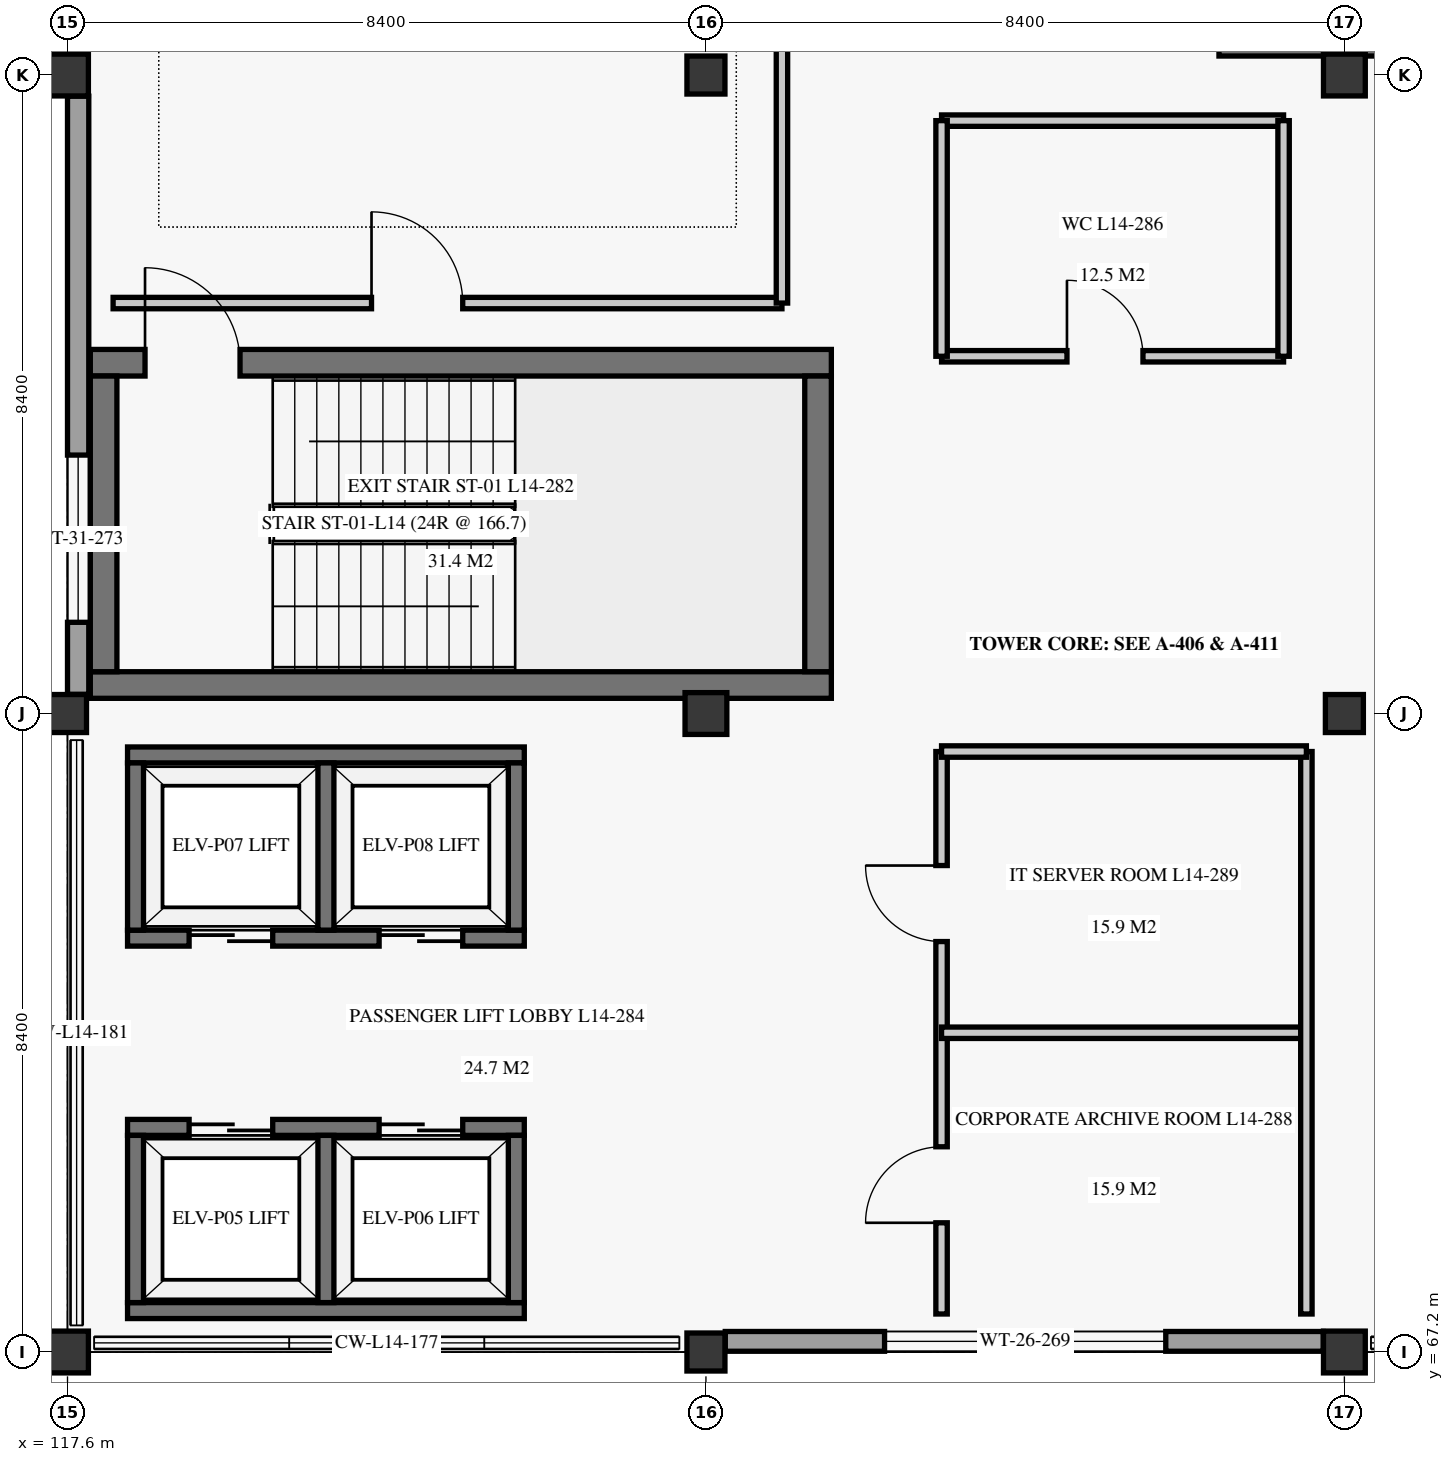
"""IFC4 building model, lengths in metres.
Left out: names, types, materials, properties, quantities, classifications, styles, units other than length and angle.
Written with IfcOpenShell. Run it as: python <this file> out.ifc"""

import sys

from ifc_helpers import new_model, si_unit, direction, frame, frame_2d, origin, origin_2d, place, context, subcontext, project, spatial, rectangle, extrude, element, fill, save


model = new_model("IFC4")
c1 = context("Model", 3, precision=1e-05, world=origin(), true_north=direction((0.0, 1.0)))
c2 = subcontext(c1, "Body", "Model", "MODEL_VIEW")
j1 = project(units=[si_unit("LENGTHUNIT", "METRE"), si_unit("PLANEANGLEUNIT", "RADIAN")], contexts=[c1])
p1 = place(None, origin())
s1 = spatial("IfcSite", under=j1, at=p1, CompositionType="ELEMENT")
p2 = place(p1, origin())
s2 = spatial("IfcBuilding", under=s1, at=p2, CompositionType="ELEMENT")
p3 = place(p2, frame((0.0, 0.0, 58.7)))
s3 = spatial("IfcBuildingStorey", under=s2, at=p3, CompositionType="ELEMENT", Elevation=58.7)
p4 = place(p3, frame((117.6, 67.2, 0.0), z_axis=(0.0, 0.0, 1.0), x_axis=(1.0, 0.0, 0.0)))
e1 = element("IfcColumn", 1, at=p4, inside=s3, PredefinedType="COLUMN", context=c2, shape_type="SweptSolid", body=[
    extrude(rectangle(XDim=0.55, YDim=0.55, at=origin_2d()), origin(), (0.0, 0.0, 1.0), 3.72),
])
p5 = place(p3, frame((117.6, 75.6, 0.0), z_axis=(0.0, 0.0, 1.0), x_axis=(1.0, 0.0, 0.0)))
e2 = element("IfcColumn", 2, at=p5, inside=s3, PredefinedType="COLUMN", context=c2, shape_type="SweptSolid", body=[
    extrude(rectangle(XDim=0.5, YDim=0.5, at=origin_2d()), origin(), (0.0, 0.0, 1.0), 3.72),
])
p6 = place(p3, frame((117.6, 84.0, 0.0), z_axis=(0.0, 0.0, 1.0), x_axis=(1.0, 0.0, 0.0)))
e3 = element("IfcColumn", 3, at=p6, inside=s3, PredefinedType="COLUMN", context=c2, shape_type="SweptSolid", body=[
    extrude(rectangle(XDim=0.55, YDim=0.55, at=origin_2d()), origin(), (0.0, 0.0, 1.0), 3.72),
])
p7 = place(p3, frame((126.0, 67.2, 0.0), z_axis=(0.0, 0.0, 1.0), x_axis=(1.0, 0.0, 0.0)))
e4 = element("IfcColumn", 4, at=p7, inside=s3, PredefinedType="COLUMN", context=c2, shape_type="SweptSolid", body=[
    extrude(rectangle(XDim=0.5, YDim=0.5, at=origin_2d()), origin(), (0.0, 0.0, 1.0), 3.72),
])
p8 = place(p3, frame((126.0, 75.6, 0.0), z_axis=(0.0, 0.0, 1.0), x_axis=(1.0, 0.0, 0.0)))
e5 = element("IfcColumn", 5, at=p8, inside=s3, PredefinedType="COLUMN", context=c2, shape_type="SweptSolid", body=[
    extrude(rectangle(XDim=0.55, YDim=0.55, at=origin_2d()), origin(), (0.0, 0.0, 1.0), 3.72),
])
p9 = place(p3, frame((126.0, 84.0, 0.0), z_axis=(0.0, 0.0, 1.0), x_axis=(1.0, 0.0, 0.0)))
e6 = element("IfcColumn", 6, at=p9, inside=s3, PredefinedType="COLUMN", context=c2, shape_type="SweptSolid", body=[
    extrude(rectangle(XDim=0.5, YDim=0.5, at=origin_2d()), origin(), (0.0, 0.0, 1.0), 3.72),
])
p10 = place(p3, frame((134.4, 67.2, 0.0), z_axis=(0.0, 0.0, 1.0), x_axis=(1.0, 0.0, 0.0)))
e7 = element("IfcColumn", 7, at=p10, inside=s3, PredefinedType="COLUMN", context=c2, shape_type="SweptSolid", body=[
    extrude(rectangle(XDim=0.55, YDim=0.55, at=origin_2d()), origin(), (0.0, 0.0, 1.0), 3.72),
])
p11 = place(p3, frame((134.4, 75.6, 0.0), z_axis=(0.0, 0.0, 1.0), x_axis=(1.0, 0.0, 0.0)))
e8 = element("IfcColumn", 8, at=p11, inside=s3, PredefinedType="COLUMN", context=c2, shape_type="SweptSolid", body=[
    extrude(rectangle(XDim=0.5, YDim=0.5, at=origin_2d()), origin(), (0.0, 0.0, 1.0), 3.72),
])
p12 = place(p3, frame((134.4, 84.0, 0.0), z_axis=(0.0, 0.0, 1.0), x_axis=(1.0, 0.0, 0.0)))
e9 = element("IfcColumn", 9, at=p12, inside=s3, PredefinedType="COLUMN", context=c2, shape_type="SweptSolid", body=[
    extrude(rectangle(XDim=0.55, YDim=0.55, at=origin_2d()), origin(), (0.0, 0.0, 1.0), 3.72),
])
p13 = place(p3, frame((126.254, 67.34, 0.0), z_axis=(0.0, 0.0, 1.0), x_axis=(1.0, 0.0, 0.0)))
e10 = element("IfcWall", 10, at=p13, inside=s3, PredefinedType="SOLIDWALL", context=c2, shape_type="SweptSolid", body=[
    extrude(rectangle(XDim=7.868, YDim=0.26, at=frame_2d((3.934, 0.0))), origin(), (0.0, 0.0, 1.0), 3.04),
])
p14 = place(p13, frame((2.096, 0.0, 0.85)))
e11 = element("IfcOpeningElement", 11, at=p14, cuts=e10, PredefinedType="OPENING", context=c2, shape_type="SweptSolid", body=[
    extrude(rectangle(XDim=3.7, YDim=1.9, at=frame_2d((1.85, 0.95))), frame((0.0, 0.14, 0.0), z_axis=(0.0, -1.0, 0.0), x_axis=(1.0, 0.0, 0.0)), (0.0, 0.0, 1.0), 0.28),
])
p15 = place(p3, frame((117.74, 75.852, 0.0), z_axis=(0.0, 0.0, 1.0), x_axis=(0.0, 1.0, 0.0)))
e12 = element("IfcWall", 12, at=p15, inside=s3, PredefinedType="SOLIDWALL", context=c2, shape_type="SweptSolid", body=[
    extrude(rectangle(XDim=7.87, YDim=0.28, at=frame_2d((3.935, 0.0))), origin(), (0.0, 0.0, 1.0), 3.04),
])
p16 = place(p15, frame((0.948, 0.0, 0.85)))
e13 = element("IfcOpeningElement", 13, at=p16, cuts=e12, PredefinedType="OPENING", context=c2, shape_type="SweptSolid", body=[
    extrude(rectangle(XDim=2.2, YDim=1.8, at=frame_2d((1.1, 0.9))), frame((0.0, 0.15, 0.0), z_axis=(0.0, -1.0, 0.0), x_axis=(1.0, 0.0, 0.0)), (0.0, 0.0, 1.0), 0.3),
])
p17 = place(p3, frame((117.9, 75.975, 0.0), z_axis=(0.0, 0.0, 1.0), x_axis=(1.0, 0.0, 0.0)))
e14 = element("IfcWall", 14, at=p17, inside=s3, PredefinedType="SHEAR", context=c2, shape_type="SweptSolid", body=[
    extrude(rectangle(XDim=9.75, YDim=0.35, at=frame_2d((4.875, 0.0))), origin(), (0.0, 0.0, 1.0), 3.72),
])
p18 = place(p3, frame((117.9, 80.215, 0.0), z_axis=(0.0, 0.0, 1.0), x_axis=(1.0, 0.0, 0.0)))
e15 = element("IfcWall", 15, at=p18, inside=s3, PredefinedType="SHEAR", context=c2, shape_type="SweptSolid", body=[
    extrude(rectangle(XDim=9.75, YDim=0.35, at=frame_2d((4.875, 0.0))), origin(), (0.0, 0.0, 1.0), 3.72),
])
p19 = place(p18, frame((0.72, 0.0, 0.0)))
e16 = element("IfcOpeningElement", 16, at=p19, cuts=e15, PredefinedType="OPENING", context=c2, shape_type="SweptSolid", body=[
    extrude(rectangle(XDim=1.25, YDim=2.2, at=frame_2d((0.625, 1.1))), frame((0.0, 0.185, 0.0), z_axis=(0.0, -1.0, 0.0), x_axis=(1.0, 0.0, 0.0)), (0.0, 0.0, 1.0), 0.37),
])
for number, where, z_axis, x_axis in (
    (17, (118.075, 76.15, 0.0), (0.0, 0.0, 1.0), (0.0, 1.0, 0.0)),
    (18, (127.475, 76.15, 0.0), (0.0, 0.0, 1.0), (0.0, 1.0, 0.0)),
):
    element("IfcWall", number, at=place(p3, frame(where, z_axis=z_axis, x_axis=x_axis)), inside=s3, PredefinedType="SHEAR", context=c2, shape_type="SweptSolid", body=[
        extrude(rectangle(XDim=3.89, YDim=0.35, at=frame_2d((1.945, 0.0))), origin(), (0.0, 0.0, 1.0), 3.72),
    ])
p20 = place(p3, frame((132.75, 84.425, 0.0), z_axis=(0.0, 0.0, 1.0), x_axis=(1.0, 0.0, 0.0)))
e19 = element("IfcWall", 19, at=p20, inside=s3, PredefinedType="SHEAR", context=c2, shape_type="SweptSolid", body=[
    extrude(rectangle(XDim=9.75, YDim=0.35, at=frame_2d((4.875, 0.0))), origin(), (0.0, 0.0, 1.0), 3.72),
])
p21 = place(p3, frame((118.39, 67.745, 0.0), z_axis=(0.0, 0.0, 1.0), x_axis=(1.0, 0.0, 0.0)))
e20 = element("IfcWall", 20, at=p21, inside=s3, PredefinedType="SHEAR", context=c2, shape_type="SweptSolid", body=[
    extrude(rectangle(XDim=5.22, YDim=0.21, at=frame_2d((2.61, 0.0))), origin(), (0.0, 0.0, 1.0), 3.72),
])
p22 = place(p3, frame((118.39, 70.155, 0.0), z_axis=(0.0, 0.0, 1.0), x_axis=(1.0, 0.0, 0.0)))
e21 = element("IfcWall", 21, at=p22, inside=s3, PredefinedType="SHEAR", context=c2, shape_type="SweptSolid", body=[
    extrude(rectangle(XDim=5.22, YDim=0.21, at=frame_2d((2.61, 0.0))), origin(), (0.0, 0.0, 1.0), 3.72),
])
p23 = place(p22, frame((0.81, 0.0, 0.0)))
e22 = element("IfcOpeningElement", 22, at=p23, cuts=e21, PredefinedType="OPENING", context=c2, shape_type="SweptSolid", body=[
    extrude(rectangle(XDim=1.1, YDim=2.15, at=frame_2d((0.55, 1.075))), frame((0.0, 0.115, 0.0), z_axis=(0.0, -1.0, 0.0), x_axis=(1.0, 0.0, 0.0)), (0.0, 0.0, 1.0), 0.23),
])
p24 = place(p22, frame((3.31, 0.0, 0.0)))
e23 = element("IfcOpeningElement", 23, at=p24, cuts=e21, PredefinedType="OPENING", context=c2, shape_type="SweptSolid", body=[
    extrude(rectangle(XDim=1.1, YDim=2.15, at=frame_2d((0.55, 1.075))), frame((0.0, 0.115, 0.0), z_axis=(0.0, -1.0, 0.0), x_axis=(1.0, 0.0, 0.0)), (0.0, 0.0, 1.0), 0.23),
])
for number, where, z_axis, x_axis in (
    (24, (118.495, 67.85, 0.0), (0.0, 0.0, 1.0), (0.0, 1.0, 0.0)),
    (25, (123.505, 67.85, 0.0), (0.0, 0.0, 1.0), (0.0, 1.0, 0.0)),
    (26, (121.0, 67.85, 0.0), (0.0, 0.0, 1.0), (0.0, 1.0, 0.0)),
):
    element("IfcWall", number, at=place(p3, frame(where, z_axis=z_axis, x_axis=x_axis)), inside=s3, PredefinedType="SHEAR", context=c2, shape_type="SweptSolid", body=[
        extrude(rectangle(XDim=2.2, YDim=0.21, at=frame_2d((1.1, 0.0))), origin(), (0.0, 0.0, 1.0), 3.72),
    ])
p25 = place(p3, frame((118.39, 72.645, 0.0), z_axis=(0.0, 0.0, 1.0), x_axis=(1.0, 0.0, 0.0)))
e27 = element("IfcWall", 27, at=p25, inside=s3, PredefinedType="SHEAR", context=c2, shape_type="SweptSolid", body=[
    extrude(rectangle(XDim=5.22, YDim=0.21, at=frame_2d((2.61, 0.0))), origin(), (0.0, 0.0, 1.0), 3.72),
])
p26 = place(p25, frame((0.81, 0.0, 0.0)))
e28 = element("IfcOpeningElement", 28, at=p26, cuts=e27, PredefinedType="OPENING", context=c2, shape_type="SweptSolid", body=[
    extrude(rectangle(XDim=1.1, YDim=2.15, at=frame_2d((0.55, 1.075))), frame((0.0, 0.115, 0.0), z_axis=(0.0, -1.0, 0.0), x_axis=(1.0, 0.0, 0.0)), (0.0, 0.0, 1.0), 0.23),
])
p27 = place(p25, frame((3.31, 0.0, 0.0)))
e29 = element("IfcOpeningElement", 29, at=p27, cuts=e27, PredefinedType="OPENING", context=c2, shape_type="SweptSolid", body=[
    extrude(rectangle(XDim=1.1, YDim=2.15, at=frame_2d((0.55, 1.075))), frame((0.0, 0.115, 0.0), z_axis=(0.0, -1.0, 0.0), x_axis=(1.0, 0.0, 0.0)), (0.0, 0.0, 1.0), 0.23),
])
p28 = place(p3, frame((118.39, 75.055, 0.0), z_axis=(0.0, 0.0, 1.0), x_axis=(1.0, 0.0, 0.0)))
e30 = element("IfcWall", 30, at=p28, inside=s3, PredefinedType="SHEAR", context=c2, shape_type="SweptSolid", body=[
    extrude(rectangle(XDim=5.22, YDim=0.21, at=frame_2d((2.61, 0.0))), origin(), (0.0, 0.0, 1.0), 3.72),
])
for number, where, z_axis, x_axis in (
    (31, (118.495, 72.75, 0.0), (0.0, 0.0, 1.0), (0.0, 1.0, 0.0)),
    (32, (123.505, 72.75, 0.0), (0.0, 0.0, 1.0), (0.0, 1.0, 0.0)),
    (33, (121.0, 72.75, 0.0), (0.0, 0.0, 1.0), (0.0, 1.0, 0.0)),
):
    element("IfcWall", number, at=place(p3, frame(where, z_axis=z_axis, x_axis=x_axis)), inside=s3, PredefinedType="SHEAR", context=c2, shape_type="SweptSolid", body=[
        extrude(rectangle(XDim=2.2, YDim=0.21, at=frame_2d((1.1, 0.0))), origin(), (0.0, 0.0, 1.0), 3.72),
    ])
p29 = place(p3, frame((129.1, 80.3, 0.0), z_axis=(0.0, 0.0, 1.0), x_axis=(1.0, 0.0, 0.0)))
e34 = element("IfcWall", 34, at=p29, inside=s3, PredefinedType="PARTITIONING", context=c2, shape_type="SweptSolid", body=[
    extrude(rectangle(XDim=4.5, YDim=0.15, at=frame_2d((2.25, 0.0))), origin(), (0.0, 0.0, 1.0), 3.34),
])
p30 = place(p29, frame((1.65, 0.0, 0.0)))
e35 = element("IfcOpeningElement", 35, at=p30, cuts=e34, PredefinedType="OPENING", context=c2, shape_type="SweptSolid", body=[
    extrude(rectangle(XDim=1.0, YDim=2.1, at=frame_2d((0.5, 1.05))), frame((0.0, 0.085, 0.0), z_axis=(0.0, -1.0, 0.0), x_axis=(1.0, 0.0, 0.0)), (0.0, 0.0, 1.0), 0.17),
])
p31 = place(p3, frame((129.1, 83.4, 0.0), z_axis=(0.0, 0.0, 1.0), x_axis=(1.0, 0.0, 0.0)))
e36 = element("IfcWall", 36, at=p31, inside=s3, PredefinedType="PARTITIONING", context=c2, shape_type="SweptSolid", body=[
    extrude(rectangle(XDim=4.5, YDim=0.15, at=frame_2d((2.25, 0.0))), origin(), (0.0, 0.0, 1.0), 3.34),
])
for number, where, z_axis, x_axis in (
    (37, (129.1, 80.3, 0.0), (0.0, 0.0, 1.0), (0.0, 1.0, 0.0)),
    (38, (133.6, 80.3, 0.0), (0.0, 0.0, 1.0), (0.0, 1.0, 0.0)),
):
    element("IfcWall", number, at=place(p3, frame(where, z_axis=z_axis, x_axis=x_axis)), inside=s3, PredefinedType="PARTITIONING", context=c2, shape_type="SweptSolid", body=[
        extrude(rectangle(XDim=3.1, YDim=0.15, at=frame_2d((1.55, 0.0))), origin(), (0.0, 0.0, 1.0), 3.34),
    ])
p32 = place(p3, frame((129.1, 67.7, 0.0), z_axis=(0.0, 0.0, 1.0), x_axis=(0.0, 1.0, 0.0)))
e39 = element("IfcWall", 39, at=p32, inside=s3, PredefinedType="PARTITIONING", context=c2, shape_type="SweptSolid", body=[
    extrude(rectangle(XDim=7.4, YDim=0.15, at=frame_2d((3.7, 0.0))), origin(), (0.0, 0.0, 1.0), 3.34),
])
p33 = place(p32, frame((1.2, 0.0, 0.0)))
e40 = element("IfcOpeningElement", 40, at=p33, cuts=e39, PredefinedType="OPENING", context=c2, shape_type="SweptSolid", body=[
    extrude(rectangle(XDim=1.0, YDim=2.1, at=frame_2d((0.5, 1.05))), frame((0.0, 0.085, 0.0), z_axis=(0.0, -1.0, 0.0), x_axis=(1.0, 0.0, 0.0)), (0.0, 0.0, 1.0), 0.17),
])
p34 = place(p32, frame((4.9, 0.0, 0.0)))
e41 = element("IfcOpeningElement", 41, at=p34, cuts=e39, PredefinedType="OPENING", context=c2, shape_type="SweptSolid", body=[
    extrude(rectangle(XDim=1.0, YDim=2.1, at=frame_2d((0.5, 1.05))), frame((0.0, 0.085, 0.0), z_axis=(0.0, -1.0, 0.0), x_axis=(1.0, 0.0, 0.0)), (0.0, 0.0, 1.0), 0.17),
])
p35 = place(p3, frame((129.1, 71.4, 0.0), z_axis=(0.0, 0.0, 1.0), x_axis=(1.0, 0.0, 0.0)))
e42 = element("IfcWall", 42, at=p35, inside=s3, PredefinedType="PARTITIONING", context=c2, shape_type="SweptSolid", body=[
    extrude(rectangle(XDim=4.8, YDim=0.15, at=frame_2d((2.4, 0.0))), origin(), (0.0, 0.0, 1.0), 3.34),
])
p36 = place(p3, frame((133.9, 67.7, 0.0), z_axis=(0.0, 0.0, 1.0), x_axis=(0.0, 1.0, 0.0)))
e43 = element("IfcWall", 43, at=p36, inside=s3, PredefinedType="PARTITIONING", context=c2, shape_type="SweptSolid", body=[
    extrude(rectangle(XDim=7.4, YDim=0.15, at=frame_2d((3.7, 0.0))), origin(), (0.0, 0.0, 1.0), 3.34),
])
p37 = place(p3, frame((129.1, 75.1, 0.0), z_axis=(0.0, 0.0, 1.0), x_axis=(1.0, 0.0, 0.0)))
e44 = element("IfcWall", 44, at=p37, inside=s3, PredefinedType="PARTITIONING", context=c2, shape_type="SweptSolid", body=[
    extrude(rectangle(XDim=4.8, YDim=0.15, at=frame_2d((2.4, 0.0))), origin(), (0.0, 0.0, 1.0), 3.34),
])
p38 = place(p3, frame((118.2, 81.0, 0.0), z_axis=(0.0, 0.0, 1.0), x_axis=(1.0, 0.0, 0.0)))
e45 = element("IfcWall", 45, at=p38, inside=s3, PredefinedType="PARTITIONING", context=c2, shape_type="SweptSolid", body=[
    extrude(rectangle(XDim=8.8, YDim=0.15, at=frame_2d((4.4, 0.0))), origin(), (0.0, 0.0, 1.0), 3.34),
])
p39 = place(p38, frame((3.4, 0.0, 0.0)))
e46 = element("IfcOpeningElement", 46, at=p39, cuts=e45, PredefinedType="OPENING", context=c2, shape_type="SweptSolid", body=[
    extrude(rectangle(XDim=1.2, YDim=2.3, at=frame_2d((0.6, 1.15))), frame((0.0, 0.085, 0.0), z_axis=(0.0, -1.0, 0.0), x_axis=(1.0, 0.0, 0.0)), (0.0, 0.0, 1.0), 0.17),
])
p40 = place(p3, frame((127.0, 81.0, 0.0), z_axis=(0.0, 0.0, 1.0), x_axis=(0.0, 1.0, 0.0)))
e47 = element("IfcWall", 47, at=p40, inside=s3, PredefinedType="PARTITIONING", context=c2, shape_type="SweptSolid", body=[
    extrude(rectangle(XDim=11.0, YDim=0.15, at=frame_2d((5.5, 0.0))), origin(), (0.0, 0.0, 1.0), 3.34),
])
p41 = place(p14, origin())
e48 = element("IfcWindow", 48, at=p41, inside=s3, PartitioningType="SINGLE_PANEL", PredefinedType="WINDOW", context=c2, shape_type="SweptSolid", body=[
    extrude(rectangle(XDim=3.7, YDim=1.9, at=frame_2d((1.85, 0.95))), frame((0.0, 0.03, 0.0), z_axis=(0.0, -1.0, 0.0), x_axis=(1.0, 0.0, 0.0)), (0.0, 0.0, 1.0), 0.06),
])
fill(e11, e48)
p42 = place(p16, origin())
e49 = element("IfcWindow", 49, at=p42, inside=s3, PartitioningType="SINGLE_PANEL", PredefinedType="WINDOW", context=c2, shape_type="SweptSolid", body=[
    extrude(rectangle(XDim=2.2, YDim=1.8, at=frame_2d((1.1, 0.9))), frame((0.0, 0.03, 0.0), z_axis=(0.0, -1.0, 0.0), x_axis=(1.0, 0.0, 0.0)), (0.0, 0.0, 1.0), 0.06),
])
fill(e13, e49)
p43 = place(p19, origin())
e50 = element("IfcDoor", 50, at=p43, inside=s3, OperationType="SINGLE_SWING_LEFT", PredefinedType="DOOR", context=c2, shape_type="SweptSolid", body=[
    extrude(rectangle(XDim=1.25, YDim=2.2, at=frame_2d((0.625, 1.1))), frame((0.0, 0.025, 0.0), z_axis=(0.0, -1.0, 0.0), x_axis=(1.0, 0.0, 0.0)), (0.0, 0.0, 1.0), 0.05),
])
fill(e16, e50)
p44 = place(p23, origin())
e51 = element("IfcDoor", 51, at=p44, inside=s3, OperationType="DOUBLE_DOOR_SLIDING", PredefinedType="DOOR", context=c2, shape_type="SweptSolid", body=[
    extrude(rectangle(XDim=1.1, YDim=2.15, at=frame_2d((0.55, 1.075))), frame((0.0, 0.025, 0.0), z_axis=(0.0, -1.0, 0.0), x_axis=(1.0, 0.0, 0.0)), (0.0, 0.0, 1.0), 0.05),
])
fill(e22, e51)
p45 = place(p24, origin())
e52 = element("IfcDoor", 52, at=p45, inside=s3, OperationType="DOUBLE_DOOR_SLIDING", PredefinedType="DOOR", context=c2, shape_type="SweptSolid", body=[
    extrude(rectangle(XDim=1.1, YDim=2.15, at=frame_2d((0.55, 1.075))), frame((0.0, 0.025, 0.0), z_axis=(0.0, -1.0, 0.0), x_axis=(1.0, 0.0, 0.0)), (0.0, 0.0, 1.0), 0.05),
])
fill(e23, e52)
p46 = place(p26, origin())
e53 = element("IfcDoor", 53, at=p46, inside=s3, OperationType="DOUBLE_DOOR_SLIDING", PredefinedType="DOOR", context=c2, shape_type="SweptSolid", body=[
    extrude(rectangle(XDim=1.1, YDim=2.15, at=frame_2d((0.55, 1.075))), frame((0.0, 0.025, 0.0), z_axis=(0.0, -1.0, 0.0), x_axis=(1.0, 0.0, 0.0)), (0.0, 0.0, 1.0), 0.05),
])
fill(e28, e53)
p47 = place(p27, origin())
e54 = element("IfcDoor", 54, at=p47, inside=s3, OperationType="DOUBLE_DOOR_SLIDING", PredefinedType="DOOR", context=c2, shape_type="SweptSolid", body=[
    extrude(rectangle(XDim=1.1, YDim=2.15, at=frame_2d((0.55, 1.075))), frame((0.0, 0.025, 0.0), z_axis=(0.0, -1.0, 0.0), x_axis=(1.0, 0.0, 0.0)), (0.0, 0.0, 1.0), 0.05),
])
fill(e29, e54)
p48 = place(p30, origin())
e55 = element("IfcDoor", 55, at=p48, inside=s3, OperationType="SINGLE_SWING_LEFT", PredefinedType="DOOR", context=c2, shape_type="SweptSolid", body=[
    extrude(rectangle(XDim=1.0, YDim=2.1, at=frame_2d((0.5, 1.05))), frame((0.0, 0.025, 0.0), z_axis=(0.0, -1.0, 0.0), x_axis=(1.0, 0.0, 0.0)), (0.0, 0.0, 1.0), 0.05),
])
fill(e35, e55)
p49 = place(p33, origin())
e56 = element("IfcDoor", 56, at=p49, inside=s3, OperationType="SINGLE_SWING_LEFT", PredefinedType="DOOR", context=c2, shape_type="SweptSolid", body=[
    extrude(rectangle(XDim=1.0, YDim=2.1, at=frame_2d((0.5, 1.05))), frame((0.0, 0.025, 0.0), z_axis=(0.0, -1.0, 0.0), x_axis=(1.0, 0.0, 0.0)), (0.0, 0.0, 1.0), 0.05),
])
fill(e40, e56)
p50 = place(p34, origin())
e57 = element("IfcDoor", 57, at=p50, inside=s3, OperationType="SINGLE_SWING_RIGHT", PredefinedType="DOOR", context=c2, shape_type="SweptSolid", body=[
    extrude(rectangle(XDim=1.0, YDim=2.1, at=frame_2d((0.5, 1.05))), frame((0.0, 0.025, 0.0), z_axis=(0.0, -1.0, 0.0), x_axis=(1.0, 0.0, 0.0)), (0.0, 0.0, 1.0), 0.05),
])
fill(e41, e57)
p51 = place(p39, origin())
e58 = element("IfcDoor", 58, at=p51, inside=s3, OperationType="SINGLE_SWING_LEFT", PredefinedType="DOOR", context=c2, shape_type="SweptSolid", body=[
    extrude(rectangle(XDim=1.2, YDim=2.3, at=frame_2d((0.6, 1.15))), frame((0.0, 0.025, 0.0), z_axis=(0.0, -1.0, 0.0), x_axis=(1.0, 0.0, 0.0)), (0.0, 0.0, 1.0), 0.05),
])
fill(e46, e58)
save(model, sys.argv[1])
